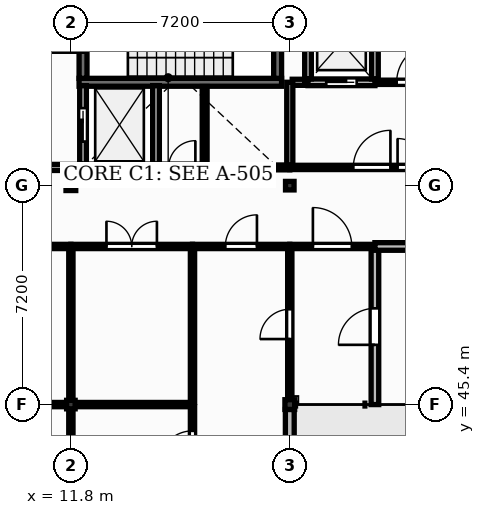
"""IFC4 building model, lengths in metres.
Left out: names, types, materials, properties, quantities, classifications, styles, units other than length and angle.
Written with IfcOpenShell. Run it as: python <this file> out.ifc"""

import sys

from ifc_helpers import new_model, si_unit, direction, frame, frame_2d, origin, origin_2d, place, context, subcontext, project, spatial, rectangle, extrude, element, fill, save


model = new_model("IFC4")
c1 = context("Model", 3, precision=1e-05, world=origin(), true_north=direction((0.0, 1.0)))
c2 = subcontext(c1, "Body", "Model", "MODEL_VIEW")
j1 = project(units=[si_unit("LENGTHUNIT", "METRE"), si_unit("PLANEANGLEUNIT", "RADIAN")], contexts=[c1])
p1 = place(None, origin())
s1 = spatial("IfcSite", under=j1, at=p1, CompositionType="ELEMENT")
p2 = place(p1, origin())
s2 = spatial("IfcBuilding", under=s1, at=p2, CompositionType="ELEMENT")
p3 = place(p2, frame((0.0, 0.0, 13.2)))
s3 = spatial("IfcBuildingStorey", under=s2, at=p3, CompositionType="ELEMENT", Elevation=13.2)
p4 = place(p3, frame((11.8, 45.4, 0.0), z_axis=(0.0, 0.0, 1.0), x_axis=(1.0, 0.0, 0.0)))
e1 = element("IfcColumn", 1, at=p4, inside=s3, PredefinedType="COLUMN", context=c2, shape_type="SweptSolid", body=[
    extrude(rectangle(XDim=0.28, YDim=0.28, at=origin_2d()), origin(), (0.0, 0.0, 1.0), 3.98),
])
p5 = place(p3, frame((11.8, 52.6, 0.0), z_axis=(0.0, 0.0, 1.0), x_axis=(1.0, 0.0, 0.0)))
e2 = element("IfcColumn", 2, at=p5, inside=s3, PredefinedType="COLUMN", context=c2, shape_type="SweptSolid", body=[
    extrude(rectangle(XDim=0.32, YDim=0.32, at=origin_2d()), origin(), (0.0, 0.0, 1.0), 4.01),
])
p6 = place(p3, frame((19.0, 45.4, 0.0), z_axis=(0.0, 0.0, 1.0), x_axis=(1.0, 0.0, 0.0)))
e3 = element("IfcColumn", 3, at=p6, inside=s3, PredefinedType="COLUMN", context=c2, shape_type="SweptSolid", body=[
    extrude(rectangle(XDim=0.32, YDim=0.32, at=origin_2d()), origin(), (0.0, 0.0, 1.0), 3.98),
])
p7 = place(p3, frame((19.0, 52.6, 0.0), z_axis=(0.0, 0.0, 1.0), x_axis=(1.0, 0.0, 0.0)))
e4 = element("IfcColumn", 4, at=p7, inside=s3, PredefinedType="COLUMN", context=c2, shape_type="SweptSolid", body=[
    extrude(rectangle(XDim=0.28, YDim=0.28, at=origin_2d()), origin(), (0.0, 0.0, 1.0), 4.01),
])
p8 = place(p3, frame((19.0, 36.94, 0.0), z_axis=(0.0, 0.0, 1.0), x_axis=(0.0, 1.0, 0.0)))
e5 = element("IfcWall", 5, at=p8, inside=s3, PredefinedType="SOLIDWALL", context=c2, shape_type="SweptSolid", body=[
    extrude(rectangle(XDim=8.3, YDim=0.29, at=frame_2d((4.15, 0.0))), origin(), (0.0, 0.0, 1.0), 3.49),
])
p9 = place(p8, frame((1.99, 0.0, 1.05)))
e6 = element("IfcOpeningElement", 6, at=p9, cuts=e5, PredefinedType="OPENING", context=c2, shape_type="SweptSolid", body=[
    extrude(rectangle(XDim=1.82, YDim=1.65, at=frame_2d((0.91, 0.825))), frame((0.0, 0.155, 0.0), z_axis=(0.0, -1.0, 0.0), x_axis=(1.0, 0.0, 0.0)), (0.0, 0.0, 1.0), 0.31),
])
p10 = place(p8, frame((4.49, 0.0, 1.05)))
e7 = element("IfcOpeningElement", 7, at=p10, cuts=e5, PredefinedType="OPENING", context=c2, shape_type="SweptSolid", body=[
    extrude(rectangle(XDim=1.82, YDim=1.65, at=frame_2d((0.91, 0.825))), frame((0.0, 0.155, 0.0), z_axis=(0.0, -1.0, 0.0), x_axis=(1.0, 0.0, 0.0)), (0.0, 0.0, 1.0), 0.31),
])
p11 = place(p3, frame((12.07, 56.0, 0.0), z_axis=(0.0, 0.0, 1.0), x_axis=(1.0, 0.0, 0.0)))
e8 = element("IfcWall", 8, at=p11, inside=s3, PredefinedType="SHEAR", context=c2, shape_type="SweptSolid", body=[
    extrude(rectangle(XDim=6.66, YDim=0.26, at=frame_2d((3.33, 0.0))), origin(), (0.0, 0.0, 1.0), 3.95),
])
p12 = place(p3, frame((12.2, 56.13, 0.0), z_axis=(0.0, 0.0, 1.0), x_axis=(0.0, 1.0, 0.0)))
e9 = element("IfcWall", 9, at=p12, inside=s3, PredefinedType="SHEAR", context=c2, shape_type="SweptSolid", body=[
    extrude(rectangle(XDim=2.94, YDim=0.26, at=frame_2d((1.47, 0.0))), origin(), (0.0, 0.0, 1.0), 3.95),
])
p13 = place(p12, frame((0.845, 0.0, 0.0)))
e10 = element("IfcOpeningElement", 10, at=p13, cuts=e9, PredefinedType="OPENING", context=c2, shape_type="SweptSolid", body=[
    extrude(rectangle(XDim=1.25, YDim=2.15, at=frame_2d((0.625, 1.075))), frame((0.0, 0.14, 0.0), z_axis=(0.0, -1.0, 0.0), x_axis=(1.0, 0.0, 0.0)), (0.0, 0.0, 1.0), 0.28),
])
p14 = place(p3, frame((18.6, 56.13, 0.0), z_axis=(0.0, 0.0, 1.0), x_axis=(0.0, 1.0, 0.0)))
e11 = element("IfcWall", 11, at=p14, inside=s3, PredefinedType="SHEAR", context=c2, shape_type="SweptSolid", body=[
    extrude(rectangle(XDim=2.94, YDim=0.26, at=frame_2d((1.47, 0.0))), origin(), (0.0, 0.0, 1.0), 3.95),
])
p15 = place(p3, frame((12.2, 53.2, 0.0), z_axis=(0.0, 0.0, 1.0), x_axis=(1.0, 0.0, 0.0)))
e12 = element("IfcWall", 12, at=p15, inside=s3, PredefinedType="SOLIDWALL", context=c2, shape_type="SweptSolid", body=[
    extrude(rectangle(XDim=2.4, YDim=0.22, at=frame_2d((1.2, 0.0))), origin(), (0.0, 0.0, 1.0), 3.95),
])
p16 = place(p3, frame((12.2, 53.31, 0.0), z_axis=(0.0, 0.0, 1.0), x_axis=(0.0, 1.0, 0.0)))
e13 = element("IfcWall", 13, at=p16, inside=s3, PredefinedType="SOLIDWALL", context=c2, shape_type="SweptSolid", body=[
    extrude(rectangle(XDim=2.58, YDim=0.22, at=frame_2d((1.29, 0.0))), origin(), (0.0, 0.0, 1.0), 3.95),
])
p17 = place(p16, frame((0.74, 0.0, 0.0)))
e14 = element("IfcOpeningElement", 14, at=p17, cuts=e13, PredefinedType="OPENING", context=c2, shape_type="SweptSolid", body=[
    extrude(rectangle(XDim=1.1, YDim=2.15, at=frame_2d((0.55, 1.075))), frame((0.0, 0.12, 0.0), z_axis=(0.0, -1.0, 0.0), x_axis=(1.0, 0.0, 0.0)), (0.0, 0.0, 1.0), 0.24),
])
p18 = place(p3, frame((14.6, 53.31, 0.0), z_axis=(0.0, 0.0, 1.0), x_axis=(0.0, 1.0, 0.0)))
e15 = element("IfcWall", 15, at=p18, inside=s3, PredefinedType="SOLIDWALL", context=c2, shape_type="SweptSolid", body=[
    extrude(rectangle(XDim=2.58, YDim=0.22, at=frame_2d((1.29, 0.0))), origin(), (0.0, 0.0, 1.0), 3.95),
])
p19 = place(p3, frame((19.6, 56.0, 0.0), z_axis=(0.0, 0.0, 1.0), x_axis=(1.0, 0.0, 0.0)))
e16 = element("IfcWall", 16, at=p19, inside=s3, PredefinedType="SOLIDWALL", context=c2, shape_type="SweptSolid", body=[
    extrude(rectangle(XDim=2.2, YDim=0.22, at=frame_2d((1.1, 0.0))), origin(), (0.0, 0.0, 1.0), 3.95),
])
p20 = place(p19, frame((0.6, 0.0, 0.0)))
e17 = element("IfcOpeningElement", 17, at=p20, cuts=e16, PredefinedType="OPENING", context=c2, shape_type="SweptSolid", body=[
    extrude(rectangle(XDim=1.0, YDim=2.15, at=frame_2d((0.5, 1.075))), frame((0.0, 0.12, 0.0), z_axis=(0.0, -1.0, 0.0), x_axis=(1.0, 0.0, 0.0)), (0.0, 0.0, 1.0), 0.24),
])
for number, where, z_axis, x_axis in (
    (18, (19.6, 56.11, 0.0), (0.0, 0.0, 1.0), (0.0, 1.0, 0.0)),
    (19, (21.8, 56.11, 0.0), (0.0, 0.0, 1.0), (0.0, 1.0, 0.0)),
):
    element("IfcWall", number, at=place(p3, frame(where, z_axis=z_axis, x_axis=x_axis)), inside=s3, PredefinedType="SOLIDWALL", context=c2, shape_type="SweptSolid", body=[
        extrude(rectangle(XDim=2.38, YDim=0.22, at=frame_2d((1.19, 0.0))), origin(), (0.0, 0.0, 1.0), 3.95),
    ])
p21 = place(p3, frame((7.8, 53.2, 0.0), z_axis=(0.0, 0.0, 1.0), x_axis=(1.0, 0.0, 0.0)))
e20 = element("IfcWall", 20, at=p21, inside=s3, PredefinedType="PARTITIONING", context=c2, shape_type="SweptSolid", body=[
    extrude(rectangle(XDim=4.29, YDim=0.2, at=frame_2d((2.145, 0.0))), origin(), (0.0, 0.0, 1.0), 3.96),
])
p22 = place(p21, frame((1.465, 0.0, 0.0)))
e21 = element("IfcOpeningElement", 21, at=p22, cuts=e20, PredefinedType="OPENING", context=c2, shape_type="SweptSolid", body=[
    extrude(rectangle(XDim=1.36, YDim=2.2, at=frame_2d((0.68, 1.1))), frame((0.0, 0.11, 0.0), z_axis=(0.0, -1.0, 0.0), x_axis=(1.0, 0.0, 0.0)), (0.0, 0.0, 1.0), 0.22),
])
p23 = place(p3, frame((8.625, 45.4, 0.0), z_axis=(0.0, 0.0, 1.0), x_axis=(1.0, 0.0, 0.0)))
e22 = element("IfcWall", 22, at=p23, inside=s3, PredefinedType="PARTITIONING", context=c2, shape_type="SweptSolid", body=[
    extrude(rectangle(XDim=3.035, YDim=0.14, at=frame_2d((1.518, 0.0))), origin(), (0.0, 0.0, 1.0), 3.52),
])
p24 = place(p3, frame((8.625, 50.6, 0.0), z_axis=(0.0, 0.0, 1.0), x_axis=(1.0, 0.0, 0.0)))
e23 = element("IfcWall", 23, at=p24, inside=s3, PredefinedType="PARTITIONING", context=c2, shape_type="SweptSolid", body=[
    extrude(rectangle(XDim=3.175, YDim=0.14, at=frame_2d((1.587, 0.0))), origin(), (0.0, 0.0, 1.0), 3.93),
])
p25 = place(p24, frame((1.038, 0.0, 0.0)))
e24 = element("IfcOpeningElement", 24, at=p25, cuts=e23, PredefinedType="OPENING", context=c2, shape_type="SweptSolid", body=[
    extrude(rectangle(XDim=1.1, YDim=2.1, at=frame_2d((0.55, 1.05))), frame((0.0, 0.08, 0.0), z_axis=(0.0, -1.0, 0.0), x_axis=(1.0, 0.0, 0.0)), (0.0, 0.0, 1.0), 0.16),
])
p26 = place(p3, frame((11.8, 42.641, 0.0), z_axis=(0.0, 0.0, 1.0), x_axis=(0.0, 1.0, 0.0)))
e25 = element("IfcWall", 25, at=p26, inside=s3, PredefinedType="PARTITIONING", context=c2, shape_type="SweptSolid", body=[
    extrude(rectangle(XDim=2.619, YDim=0.14, at=frame_2d((1.31, 0.0))), origin(), (0.0, 0.0, 1.0), 3.49),
])
p27 = place(p3, frame((11.8, 45.54, 0.0), z_axis=(0.0, 0.0, 1.0), x_axis=(0.0, 1.0, 0.0)))
e26 = element("IfcWall", 26, at=p27, inside=s3, PredefinedType="PARTITIONING", context=c2, shape_type="SweptSolid", body=[
    extrude(rectangle(XDim=4.99, YDim=0.14, at=frame_2d((2.495, 0.0))), origin(), (0.0, 0.0, 1.0), 3.46),
])
p28 = place(p3, frame((11.94, 45.4, 0.0), z_axis=(0.0, 0.0, 1.0), x_axis=(1.0, 0.0, 0.0)))
e27 = element("IfcWall", 27, at=p28, inside=s3, PredefinedType="PARTITIONING", context=c2, shape_type="SweptSolid", body=[
    extrude(rectangle(XDim=3.86, YDim=0.14, at=frame_2d((1.93, 0.0))), origin(), (0.0, 0.0, 1.0), 3.52),
])
p29 = place(p3, frame((11.8, 50.6, 0.0), z_axis=(0.0, 0.0, 1.0), x_axis=(1.0, 0.0, 0.0)))
e28 = element("IfcWall", 28, at=p29, inside=s3, PredefinedType="PARTITIONING", context=c2, shape_type="SweptSolid", body=[
    extrude(rectangle(XDim=4.0, YDim=0.14, at=frame_2d((2.0, 0.0))), origin(), (0.0, 0.0, 1.0), 3.93),
])
p30 = place(p29, frame((1.17, 0.0, 0.0)))
e29 = element("IfcOpeningElement", 29, at=p30, cuts=e28, PredefinedType="OPENING", context=c2, shape_type="SweptSolid", body=[
    extrude(rectangle(XDim=1.66, YDim=2.3, at=frame_2d((0.83, 1.15))), frame((0.0, 0.08, 0.0), z_axis=(0.0, -1.0, 0.0), x_axis=(1.0, 0.0, 0.0)), (0.0, 0.0, 1.0), 0.16),
])
p31 = place(p3, frame((14.71, 53.2, 0.0), z_axis=(0.0, 0.0, 1.0), x_axis=(1.0, 0.0, 0.0)))
e30 = element("IfcWall", 30, at=p31, inside=s3, PredefinedType="SOLIDWALL", context=c2, shape_type="SweptSolid", body=[
    extrude(rectangle(XDim=1.49, YDim=0.22, at=frame_2d((0.745, 0.0))), origin(), (0.0, 0.0, 1.0), 3.96),
])
p32 = place(p31, frame((0.305, 0.0, 0.0)))
e31 = element("IfcOpeningElement", 31, at=p32, cuts=e30, PredefinedType="OPENING", context=c2, shape_type="SweptSolid", body=[
    extrude(rectangle(XDim=0.88, YDim=2.05, at=frame_2d((0.44, 1.025))), frame((0.0, 0.12, 0.0), z_axis=(0.0, -1.0, 0.0), x_axis=(1.0, 0.0, 0.0)), (0.0, 0.0, 1.0), 0.24),
])
p33 = place(p3, frame((15.8, 42.641, 0.0), z_axis=(0.0, 0.0, 1.0), x_axis=(0.0, 1.0, 0.0)))
e32 = element("IfcWall", 32, at=p33, inside=s3, PredefinedType="PARTITIONING", context=c2, shape_type="SweptSolid", body=[
    extrude(rectangle(XDim=2.689, YDim=0.14, at=frame_2d((1.344, 0.0))), origin(), (0.0, 0.0, 1.0), 3.93),
])
p34 = place(p33, frame((0.794, 0.0, 0.0)))
e33 = element("IfcOpeningElement", 33, at=p34, cuts=e32, PredefinedType="OPENING", context=c2, shape_type="SweptSolid", body=[
    extrude(rectangle(XDim=1.1, YDim=2.1, at=frame_2d((0.55, 1.05))), frame((0.0, 0.08, 0.0), z_axis=(0.0, -1.0, 0.0), x_axis=(1.0, 0.0, 0.0)), (0.0, 0.0, 1.0), 0.16),
])
p35 = place(p3, frame((15.8, 45.47, 0.0), z_axis=(0.0, 0.0, 1.0), x_axis=(0.0, 1.0, 0.0)))
e34 = element("IfcWall", 34, at=p35, inside=s3, PredefinedType="PARTITIONING", context=c2, shape_type="SweptSolid", body=[
    extrude(rectangle(XDim=5.06, YDim=0.14, at=frame_2d((2.53, 0.0))), origin(), (0.0, 0.0, 1.0), 3.93),
])
p36 = place(p3, frame((15.8, 50.6, 0.0), z_axis=(0.0, 0.0, 1.0), x_axis=(1.0, 0.0, 0.0)))
e35 = element("IfcWall", 35, at=p36, inside=s3, PredefinedType="PARTITIONING", context=c2, shape_type="SweptSolid", body=[
    extrude(rectangle(XDim=3.2, YDim=0.14, at=frame_2d((1.6, 0.0))), origin(), (0.0, 0.0, 1.0), 3.93),
])
p37 = place(p36, frame((1.08, 0.0, 0.0)))
e36 = element("IfcOpeningElement", 36, at=p37, cuts=e35, PredefinedType="OPENING", context=c2, shape_type="SweptSolid", body=[
    extrude(rectangle(XDim=1.04, YDim=2.1, at=frame_2d((0.52, 1.05))), frame((0.0, 0.08, 0.0), z_axis=(0.0, -1.0, 0.0), x_axis=(1.0, 0.0, 0.0)), (0.0, 0.0, 1.0), 0.16),
])
p38 = place(p3, frame((19.0, 45.56, 0.0), z_axis=(0.0, 0.0, 1.0), x_axis=(0.0, 1.0, 0.0)))
e37 = element("IfcWall", 37, at=p38, inside=s3, PredefinedType="PARTITIONING", context=c2, shape_type="SweptSolid", body=[
    extrude(rectangle(XDim=4.97, YDim=0.14, at=frame_2d((2.485, 0.0))), origin(), (0.0, 0.0, 1.0), 3.46),
])
p39 = place(p38, frame((1.995, 0.0, 0.0)))
e38 = element("IfcOpeningElement", 38, at=p39, cuts=e37, PredefinedType="OPENING", context=c2, shape_type="SweptSolid", body=[
    extrude(rectangle(XDim=0.98, YDim=2.15, at=frame_2d((0.49, 1.075))), frame((0.0, 0.08, 0.0), z_axis=(0.0, -1.0, 0.0), x_axis=(1.0, 0.0, 0.0)), (0.0, 0.0, 1.0), 0.16),
])
p40 = place(p3, frame((19.0, 50.6, 0.0), z_axis=(0.0, 0.0, 1.0), x_axis=(1.0, 0.0, 0.0)))
e39 = element("IfcWall", 39, at=p40, inside=s3, PredefinedType="PARTITIONING", context=c2, shape_type="SweptSolid", body=[
    extrude(rectangle(XDim=2.8, YDim=0.14, at=frame_2d((1.4, 0.0))), origin(), (0.0, 0.0, 1.0), 3.93),
])
p41 = place(p40, frame((0.76, 0.0, 0.0)))
e40 = element("IfcOpeningElement", 40, at=p41, cuts=e39, PredefinedType="OPENING", context=c2, shape_type="SweptSolid", body=[
    extrude(rectangle(XDim=1.28, YDim=2.2, at=frame_2d((0.64, 1.1))), frame((0.0, 0.08, 0.0), z_axis=(0.0, -1.0, 0.0), x_axis=(1.0, 0.0, 0.0)), (0.0, 0.0, 1.0), 0.16),
])
p42 = place(p3, frame((19.0, 53.2, 0.0), z_axis=(0.0, 0.0, 1.0), x_axis=(1.0, 0.0, 0.0)))
e41 = element("IfcWall", 41, at=p42, inside=s3, PredefinedType="PARTITIONING", context=c2, shape_type="SweptSolid", body=[
    extrude(rectangle(XDim=5.4, YDim=0.14, at=frame_2d((2.7, 0.0))), origin(), (0.0, 0.0, 1.0), 3.96),
])
p43 = place(p42, frame((2.09, 0.0, 0.0)))
e42 = element("IfcOpeningElement", 42, at=p43, cuts=e41, PredefinedType="OPENING", context=c2, shape_type="SweptSolid", body=[
    extrude(rectangle(XDim=1.22, YDim=2.1, at=frame_2d((0.61, 1.05))), frame((0.0, 0.08, 0.0), z_axis=(0.0, -1.0, 0.0), x_axis=(1.0, 0.0, 0.0)), (0.0, 0.0, 1.0), 0.16),
])
p44 = place(p42, frame((3.545, 0.0, 0.0)))
e43 = element("IfcOpeningElement", 43, at=p44, cuts=e41, PredefinedType="OPENING", context=c2, shape_type="SweptSolid", body=[
    extrude(rectangle(XDim=0.95, YDim=2.1, at=frame_2d((0.475, 1.05))), frame((0.0, 0.08, 0.0), z_axis=(0.0, -1.0, 0.0), x_axis=(1.0, 0.0, 0.0)), (0.0, 0.0, 1.0), 0.16),
])
p45 = place(p3, frame((21.8, 45.4, 0.0), z_axis=(0.0, 0.0, 1.0), x_axis=(0.0, 1.0, 0.0)))
e44 = element("IfcWall", 44, at=p45, inside=s3, PredefinedType="SOLIDWALL", context=c2, shape_type="SweptSolid", body=[
    extrude(rectangle(XDim=5.13, YDim=0.25, at=frame_2d((2.565, 0.0))), origin(), (0.0, 0.0, 1.0), 3.93),
])
p46 = place(p45, frame((1.965, 0.0, 0.0)))
e45 = element("IfcOpeningElement", 45, at=p46, cuts=e44, PredefinedType="OPENING", context=c2, shape_type="SweptSolid", body=[
    extrude(rectangle(XDim=1.2, YDim=2.15, at=frame_2d((0.6, 1.075))), frame((0.0, 0.135, 0.0), z_axis=(0.0, -1.0, 0.0), x_axis=(1.0, 0.0, 0.0)), (0.0, 0.0, 1.0), 0.27),
])
p47 = place(p3, frame((21.8, 50.6, 0.0), z_axis=(0.0, 0.0, 1.0), x_axis=(1.0, 0.0, 0.0)))
e46 = element("IfcWall", 46, at=p47, inside=s3, PredefinedType="SOLIDWALL", context=c2, shape_type="SweptSolid", body=[
    extrude(rectangle(XDim=4.4, YDim=0.25, at=frame_2d((2.2, 0.0))), origin(), (0.0, 0.0, 1.0), 3.96),
])
p48 = place(p3, frame((21.91, 56.0, 0.0), z_axis=(0.0, 0.0, 1.0), x_axis=(1.0, 0.0, 0.0)))
e47 = element("IfcWall", 47, at=p48, inside=s3, PredefinedType="PARTITIONING", context=c2, shape_type="SweptSolid", body=[
    extrude(rectangle(XDim=2.49, YDim=0.14, at=frame_2d((1.245, 0.0))), origin(), (0.0, 0.0, 1.0), 3.96),
])
p49 = place(p48, frame((0.605, 0.0, 0.0)))
e48 = element("IfcOpeningElement", 48, at=p49, cuts=e47, PredefinedType="OPENING", context=c2, shape_type="SweptSolid", body=[
    extrude(rectangle(XDim=1.28, YDim=2.2, at=frame_2d((0.64, 1.1))), frame((0.0, 0.08, 0.0), z_axis=(0.0, -1.0, 0.0), x_axis=(1.0, 0.0, 0.0)), (0.0, 0.0, 1.0), 0.16),
])
p50 = place(p3, frame((16.2, 53.27, 0.0), z_axis=(0.0, 0.0, 1.0), x_axis=(0.0, 1.0, 0.0)))
e49 = element("IfcWall", 49, at=p50, inside=s3, PredefinedType="PARTITIONING", context=c2, shape_type="SweptSolid", body=[
    extrude(rectangle(XDim=2.59, YDim=0.16, at=frame_2d((1.295, 0.0))), origin(), (0.0, 0.0, 1.0), 3.96),
])
p51 = place(p3, frame((19.49, 56.0, 0.0), z_axis=(0.0, 0.0, 1.0), x_axis=(-1.0, 0.0, 0.0)))
e50 = element("IfcWall", 50, at=p51, inside=s3, PredefinedType="PARTITIONING", context=c2, shape_type="SweptSolid", body=[
    extrude(rectangle(XDim=0.41, YDim=0.2, at=frame_2d((0.205, 0.0))), origin(), (0.0, 0.0, 1.0), 3.96),
])
p52 = place(p3, frame((19.0, 53.27, 0.0), z_axis=(0.0, 0.0, 1.0), x_axis=(0.0, 1.0, 0.0)))
e51 = element("IfcWall", 51, at=p52, inside=s3, PredefinedType="PARTITIONING", context=c2, shape_type="SweptSolid", body=[
    extrude(rectangle(XDim=2.73, YDim=0.2, at=frame_2d((1.365, 0.0))), origin(), (0.0, 0.0, 1.0), 3.49),
])
p53 = place(p3, frame((19.0, 53.2, 0.0), z_axis=(0.0, 0.0, 1.0), x_axis=(-1.0, 0.0, 0.0)))
e52 = element("IfcWall", 52, at=p53, inside=s3, PredefinedType="PARTITIONING", context=c2, shape_type="SweptSolid", body=[
    extrude(rectangle(XDim=2.8, YDim=0.16, at=frame_2d((1.4, 0.0))), origin(), (0.0, 0.0, 1.0), 3.96),
])
p54 = place(p17, origin())
e53 = element("IfcDoor", 53, at=p54, inside=s3, OperationType="SLIDING_TO_LEFT", PredefinedType="DOOR", context=c2, shape_type="SweptSolid", body=[
    extrude(rectangle(XDim=1.1, YDim=2.15, at=frame_2d((0.55, 1.075))), frame((0.0, 0.025, 0.0), z_axis=(0.0, -1.0, 0.0), x_axis=(1.0, 0.0, 0.0)), (0.0, 0.0, 1.0), 0.05),
])
fill(e14, e53)
p55 = place(p20, origin())
e54 = element("IfcDoor", 54, at=p55, inside=s3, OperationType="SLIDING_TO_LEFT", PredefinedType="DOOR", context=c2, shape_type="SweptSolid", body=[
    extrude(rectangle(XDim=1.0, YDim=2.15, at=frame_2d((0.5, 1.075))), frame((0.0, 0.025, 0.0), z_axis=(0.0, -1.0, 0.0), x_axis=(1.0, 0.0, 0.0)), (0.0, 0.0, 1.0), 0.05),
])
fill(e17, e54)
p56 = place(p13, origin())
e55 = element("IfcDoor", 55, at=p56, inside=s3, OperationType="SINGLE_SWING_LEFT", PredefinedType="DOOR", context=c2, shape_type="SweptSolid", body=[
    extrude(rectangle(XDim=1.25, YDim=2.15, at=frame_2d((0.625, 1.075))), frame((0.0, 0.025, 0.0), z_axis=(0.0, -1.0, 0.0), x_axis=(1.0, 0.0, 0.0)), (0.0, 0.0, 1.0), 0.05),
])
fill(e10, e55)
p57 = place(p43, origin())
e56 = element("IfcDoor", 56, at=p57, inside=s3, OperationType="SINGLE_SWING_RIGHT", PredefinedType="DOOR", context=c2, shape_type="SweptSolid", body=[
    extrude(rectangle(XDim=1.22, YDim=2.1, at=frame_2d((0.61, 1.05))), frame((0.0, 0.025, 0.0), z_axis=(0.0, -1.0, 0.0), x_axis=(1.0, 0.0, 0.0)), (0.0, 0.0, 1.0), 0.05),
])
fill(e42, e56)
p58 = place(p44, origin())
e57 = element("IfcDoor", 57, at=p58, inside=s3, OperationType="SINGLE_SWING_LEFT", PredefinedType="DOOR", context=c2, shape_type="SweptSolid", body=[
    extrude(rectangle(XDim=0.95, YDim=2.1, at=frame_2d((0.475, 1.05))), frame((0.0, 0.025, 0.0), z_axis=(0.0, -1.0, 0.0), x_axis=(1.0, 0.0, 0.0)), (0.0, 0.0, 1.0), 0.05),
])
fill(e43, e57)
p59 = place(p37, origin())
e58 = element("IfcDoor", 58, at=p59, inside=s3, OperationType="SINGLE_SWING_RIGHT", PredefinedType="DOOR", context=c2, shape_type="SweptSolid", body=[
    extrude(rectangle(XDim=1.04, YDim=2.1, at=frame_2d((0.52, 1.05))), frame((0.0, 0.025, 0.0), z_axis=(0.0, -1.0, 0.0), x_axis=(1.0, 0.0, 0.0)), (0.0, 0.0, 1.0), 0.05),
])
fill(e36, e58)
p60 = place(p41, origin())
e59 = element("IfcDoor", 59, at=p60, inside=s3, OperationType="SINGLE_SWING_LEFT", PredefinedType="DOOR", context=c2, shape_type="SweptSolid", body=[
    extrude(rectangle(XDim=1.28, YDim=2.2, at=frame_2d((0.64, 1.1))), frame((0.0, 0.025, 0.0), z_axis=(0.0, -1.0, 0.0), x_axis=(1.0, 0.0, 0.0)), (0.0, 0.0, 1.0), 0.05),
])
fill(e40, e59)
p61 = place(p39, origin())
e60 = element("IfcDoor", 60, at=p61, inside=s3, OperationType="SINGLE_SWING_LEFT", PredefinedType="DOOR", context=c2, shape_type="SweptSolid", body=[
    extrude(rectangle(XDim=0.98, YDim=2.15, at=frame_2d((0.49, 1.075))), frame((0.0, 0.025, 0.0), z_axis=(0.0, -1.0, 0.0), x_axis=(1.0, 0.0, 0.0)), (0.0, 0.0, 1.0), 0.05),
])
fill(e38, e60)
p62 = place(p32, origin())
e61 = element("IfcDoor", 61, at=p62, inside=s3, OperationType="SINGLE_SWING_RIGHT", PredefinedType="DOOR", context=c2, shape_type="SweptSolid", body=[
    extrude(rectangle(XDim=0.88, YDim=2.05, at=frame_2d((0.44, 1.025))), frame((0.0, 0.025, 0.0), z_axis=(0.0, -1.0, 0.0), x_axis=(1.0, 0.0, 0.0)), (0.0, 0.0, 1.0), 0.05),
])
fill(e31, e61)
p63 = place(p34, origin())
e62 = element("IfcDoor", 62, at=p63, inside=s3, OperationType="SINGLE_SWING_LEFT", PredefinedType="DOOR", context=c2, shape_type="SweptSolid", body=[
    extrude(rectangle(XDim=1.1, YDim=2.1, at=frame_2d((0.55, 1.05))), frame((0.0, 0.025, 0.0), z_axis=(0.0, -1.0, 0.0), x_axis=(1.0, 0.0, 0.0)), (0.0, 0.0, 1.0), 0.05),
])
fill(e33, e62)
p64 = place(p30, origin())
e63 = element("IfcDoor", 63, at=p64, inside=s3, OperationType="DOUBLE_DOOR_SINGLE_SWING", PredefinedType="DOOR", context=c2, shape_type="SweptSolid", body=[
    extrude(rectangle(XDim=1.66, YDim=2.3, at=frame_2d((0.83, 1.15))), frame((0.0, 0.025, 0.0), z_axis=(0.0, -1.0, 0.0), x_axis=(1.0, 0.0, 0.0)), (0.0, 0.0, 1.0), 0.05),
])
fill(e29, e63)
p65 = place(p46, origin())
e64 = element("IfcDoor", 64, at=p65, inside=s3, OperationType="SINGLE_SWING_LEFT", PredefinedType="DOOR", context=c2, shape_type="SweptSolid", body=[
    extrude(rectangle(XDim=1.2, YDim=2.15, at=frame_2d((0.6, 1.075))), frame((0.0, 0.025, 0.0), z_axis=(0.0, -1.0, 0.0), x_axis=(1.0, 0.0, 0.0)), (0.0, 0.0, 1.0), 0.05),
])
fill(e45, e64)
p66 = place(p49, origin())
e65 = element("IfcDoor", 65, at=p66, inside=s3, OperationType="SINGLE_SWING_RIGHT", PredefinedType="DOOR", context=c2, shape_type="SweptSolid", body=[
    extrude(rectangle(XDim=1.28, YDim=2.2, at=frame_2d((0.64, 1.1))), frame((0.0, 0.025, 0.0), z_axis=(0.0, -1.0, 0.0), x_axis=(1.0, 0.0, 0.0)), (0.0, 0.0, 1.0), 0.05),
])
fill(e48, e65)
save(model, sys.argv[1])
